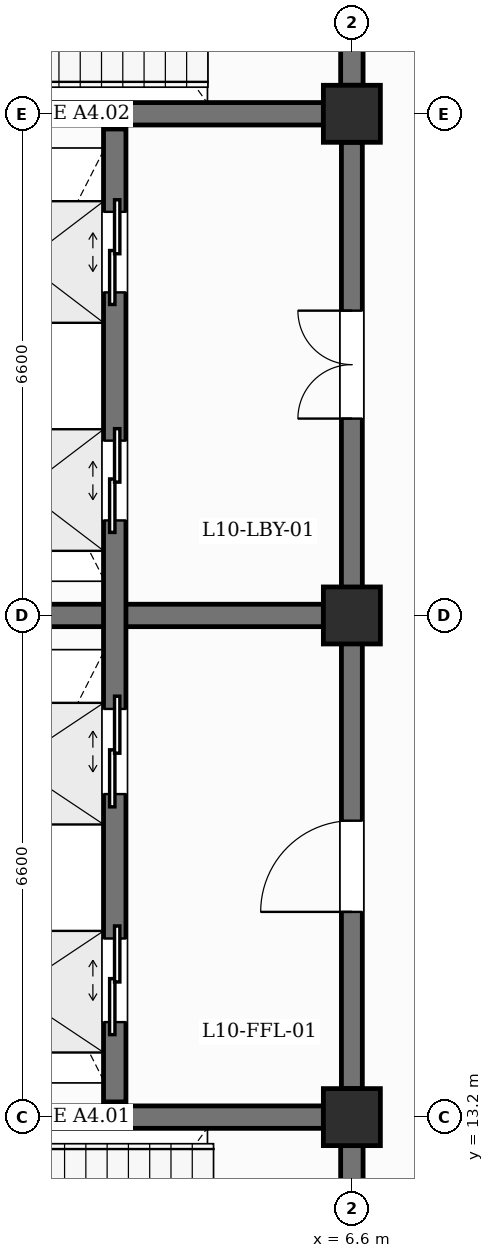
"""IFC4 building model, lengths in metres.
Left out: names, types, materials, properties, quantities, classifications, styles, units other than length and angle.
Written with IfcOpenShell. Run it as: python <this file> out.ifc"""

import sys

from ifc_helpers import new_model, si_unit, direction, frame, frame_2d, origin, origin_2d, place, context, subcontext, project, spatial, rectangle, extrude, element, fill, save


model = new_model("IFC4")
c1 = context("Model", 3, precision=1e-05, world=origin(), true_north=direction((0.0, 1.0)))
c2 = subcontext(c1, "Body", "Model", "MODEL_VIEW")
j1 = project(units=[si_unit("LENGTHUNIT", "METRE"), si_unit("PLANEANGLEUNIT", "RADIAN")], contexts=[c1])
p1 = place(None, origin())
s1 = spatial("IfcSite", under=j1, at=p1, CompositionType="ELEMENT")
p2 = place(p1, origin())
s2 = spatial("IfcBuilding", under=s1, at=p2, CompositionType="ELEMENT")
p3 = place(p2, frame((0.0, 0.0, 43.8)))
s3 = spatial("IfcBuildingStorey", under=s2, at=p3, CompositionType="ELEMENT", Elevation=43.8)
for number, where, z_axis, x_axis in (
    (1, (6.6, 13.2, 0.0), (0.0, 0.0, 1.0), (1.0, 0.0, 0.0)),
    (2, (6.6, 19.8, 0.0), (0.0, 0.0, 1.0), (1.0, 0.0, 0.0)),
    (3, (6.6, 26.4, 0.0), (0.0, 0.0, 1.0), (1.0, 0.0, 0.0)),
):
    element("IfcColumn", number, at=place(p3, frame(where, z_axis=z_axis, x_axis=x_axis)), inside=s3, PredefinedType="COLUMN", context=c2, shape_type="SweptSolid", body=[
        extrude(rectangle(XDim=0.75, YDim=0.75, at=origin_2d()), origin(), (0.0, 0.0, 1.0), 4.2),
    ])
p4 = place(p3, frame((0.375, 13.2, 0.0), z_axis=(0.0, 0.0, 1.0), x_axis=(1.0, 0.0, 0.0)))
e4 = element("IfcWall", 4, at=p4, inside=s3, PredefinedType="SHEAR", context=c2, shape_type="SweptSolid", body=[
    extrude(rectangle(XDim=5.85, YDim=0.295, at=frame_2d((2.925, 0.0))), origin(), (0.0, 0.0, 1.0), 3.29),
])
p5 = place(p3, frame((6.6, 6.975, 0.0), z_axis=(0.0, 0.0, 1.0), x_axis=(0.0, 1.0, 0.0)))
e5 = element("IfcWall", 5, at=p5, inside=s3, PredefinedType="SHEAR", context=c2, shape_type="SweptSolid", body=[
    extrude(rectangle(XDim=5.85, YDim=0.295, at=frame_2d((2.925, 0.0))), origin(), (0.0, 0.0, 1.0), 3.29),
])
p6 = place(p5, frame((2.35, 0.0, 0.0)))
e6 = element("IfcOpeningElement", 6, at=p6, cuts=e5, PredefinedType="OPENING", context=c2, shape_type="SweptSolid", body=[
    extrude(rectangle(XDim=1.15, YDim=2.2, at=frame_2d((0.575, 1.1))), frame((0.0, 0.157, 0.0), z_axis=(0.0, -1.0, 0.0), x_axis=(1.0, 0.0, 0.0)), (0.0, 0.0, 1.0), 0.315),
])
p7 = place(p3, frame((0.375, 26.4, 0.0), z_axis=(0.0, 0.0, 1.0), x_axis=(1.0, 0.0, 0.0)))
e7 = element("IfcWall", 7, at=p7, inside=s3, PredefinedType="SHEAR", context=c2, shape_type="SweptSolid", body=[
    extrude(rectangle(XDim=5.85, YDim=0.295, at=frame_2d((2.925, 0.0))), origin(), (0.0, 0.0, 1.0), 3.29),
])
p8 = place(p3, frame((6.6, 26.775, 0.0), z_axis=(0.0, 0.0, 1.0), x_axis=(0.0, 1.0, 0.0)))
e8 = element("IfcWall", 8, at=p8, inside=s3, PredefinedType="SHEAR", context=c2, shape_type="SweptSolid", body=[
    extrude(rectangle(XDim=5.875, YDim=0.295, at=frame_2d((2.938, 0.0))), origin(), (0.0, 0.0, 1.0), 3.29),
])
p9 = place(p8, frame((2.363, 0.0, 0.0)))
e9 = element("IfcOpeningElement", 9, at=p9, cuts=e8, PredefinedType="OPENING", context=c2, shape_type="SweptSolid", body=[
    extrude(rectangle(XDim=1.15, YDim=2.2, at=frame_2d((0.575, 1.1))), frame((0.0, 0.157, 0.0), z_axis=(0.0, -1.0, 0.0), x_axis=(1.0, 0.0, 0.0)), (0.0, 0.0, 1.0), 0.315),
])
p10 = place(p3, frame((0.375, 19.8, 0.0), z_axis=(0.0, 0.0, 1.0), x_axis=(1.0, 0.0, 0.0)))
e10 = element("IfcWall", 10, at=p10, inside=s3, PredefinedType="SHEAR", context=c2, shape_type="SweptSolid", body=[
    extrude(rectangle(XDim=5.85, YDim=0.295, at=frame_2d((2.925, 0.0))), origin(), (0.0, 0.0, 1.0), 3.29),
])
p11 = place(p3, frame((6.6, 13.575, 0.0), z_axis=(0.0, 0.0, 1.0), x_axis=(0.0, 1.0, 0.0)))
e11 = element("IfcWall", 11, at=p11, inside=s3, PredefinedType="SHEAR", context=c2, shape_type="SweptSolid", body=[
    extrude(rectangle(XDim=5.85, YDim=0.275, at=frame_2d((2.925, 0.0))), origin(), (0.0, 0.0, 1.0), 3.29),
])
p12 = place(p11, frame((2.325, 0.0, 0.0)))
e12 = element("IfcOpeningElement", 12, at=p12, cuts=e11, PredefinedType="OPENING", context=c2, shape_type="SweptSolid", body=[
    extrude(rectangle(XDim=1.2, YDim=2.25, at=frame_2d((0.6, 1.125))), frame((0.0, 0.147, 0.0), z_axis=(0.0, -1.0, 0.0), x_axis=(1.0, 0.0, 0.0)), (0.0, 0.0, 1.0), 0.295),
])
p13 = place(p3, frame((6.6, 20.175, 0.0), z_axis=(0.0, 0.0, 1.0), x_axis=(0.0, 1.0, 0.0)))
e13 = element("IfcWall", 13, at=p13, inside=s3, PredefinedType="SHEAR", context=c2, shape_type="SweptSolid", body=[
    extrude(rectangle(XDim=5.85, YDim=0.275, at=frame_2d((2.925, 0.0))), origin(), (0.0, 0.0, 1.0), 3.29),
])
p14 = place(p13, frame((2.215, 0.0, 0.0)))
e14 = element("IfcOpeningElement", 14, at=p14, cuts=e13, PredefinedType="OPENING", context=c2, shape_type="SweptSolid", body=[
    extrude(rectangle(XDim=1.42, YDim=2.2, at=frame_2d((0.71, 1.1))), frame((0.0, 0.147, 0.0), z_axis=(0.0, -1.0, 0.0), x_axis=(1.0, 0.0, 0.0)), (0.0, 0.0, 1.0), 0.295),
])
p15 = place(p3, frame((3.48, 13.4, 0.0), z_axis=(0.0, 0.0, 1.0), x_axis=(0.0, 1.0, 0.0)))
e15 = element("IfcWall", 15, at=p15, inside=s3, PredefinedType="SHEAR", context=c2, shape_type="SweptSolid", body=[
    extrude(rectangle(XDim=6.2, YDim=0.295, at=frame_2d((3.1, 0.0))), origin(), (0.0, 0.0, 1.0), 3.89),
])
p16 = place(p15, frame((1.05, 0.0, 0.0)))
e16 = element("IfcOpeningElement", 16, at=p16, cuts=e15, PredefinedType="OPENING", context=c2, shape_type="SweptSolid", body=[
    extrude(rectangle(XDim=1.1, YDim=2.15, at=frame_2d((0.55, 1.075))), frame((0.0, 0.157, 0.0), z_axis=(0.0, -1.0, 0.0), x_axis=(1.0, 0.0, 0.0)), (0.0, 0.0, 1.0), 0.315),
])
p17 = place(p15, frame((4.05, 0.0, 0.0)))
e17 = element("IfcOpeningElement", 17, at=p17, cuts=e15, PredefinedType="OPENING", context=c2, shape_type="SweptSolid", body=[
    extrude(rectangle(XDim=1.12, YDim=2.15, at=frame_2d((0.56, 1.075))), frame((0.0, 0.157, 0.0), z_axis=(0.0, -1.0, 0.0), x_axis=(1.0, 0.0, 0.0)), (0.0, 0.0, 1.0), 0.315),
])
p18 = place(p3, frame((3.48, 20.0, 0.0), z_axis=(0.0, 0.0, 1.0), x_axis=(0.0, 1.0, 0.0)))
e18 = element("IfcWall", 18, at=p18, inside=s3, PredefinedType="SHEAR", context=c2, shape_type="SweptSolid", body=[
    extrude(rectangle(XDim=6.2, YDim=0.295, at=frame_2d((3.1, 0.0))), origin(), (0.0, 0.0, 1.0), 3.89),
])
p19 = place(p18, frame((1.05, 0.0, 0.0)))
e19 = element("IfcOpeningElement", 19, at=p19, cuts=e18, PredefinedType="OPENING", context=c2, shape_type="SweptSolid", body=[
    extrude(rectangle(XDim=1.05, YDim=2.15, at=frame_2d((0.525, 1.075))), frame((0.0, 0.157, 0.0), z_axis=(0.0, -1.0, 0.0), x_axis=(1.0, 0.0, 0.0)), (0.0, 0.0, 1.0), 0.315),
])
p20 = place(p18, frame((4.05, 0.0, 0.0)))
e20 = element("IfcOpeningElement", 20, at=p20, cuts=e18, PredefinedType="OPENING", context=c2, shape_type="SweptSolid", body=[
    extrude(rectangle(XDim=1.06, YDim=2.15, at=frame_2d((0.53, 1.075))), frame((0.0, 0.157, 0.0), z_axis=(0.0, -1.0, 0.0), x_axis=(1.0, 0.0, 0.0)), (0.0, 0.0, 1.0), 0.315),
])
p21 = place(p16, origin())
e21 = element("IfcDoor", 21, at=p21, inside=s3, OperationType="DOUBLE_DOOR_SLIDING", PredefinedType="USERDEFINED", context=c2, shape_type="SweptSolid", body=[
    extrude(rectangle(XDim=1.1, YDim=2.15, at=frame_2d((0.55, 1.075))), frame((0.0, 0.025, 0.0), z_axis=(0.0, -1.0, 0.0), x_axis=(1.0, 0.0, 0.0)), (0.0, 0.0, 1.0), 0.05),
])
fill(e16, e21)
p22 = place(p17, origin())
e22 = element("IfcDoor", 22, at=p22, inside=s3, OperationType="DOUBLE_DOOR_SLIDING", PredefinedType="USERDEFINED", context=c2, shape_type="SweptSolid", body=[
    extrude(rectangle(XDim=1.12, YDim=2.15, at=frame_2d((0.56, 1.075))), frame((0.0, 0.025, 0.0), z_axis=(0.0, -1.0, 0.0), x_axis=(1.0, 0.0, 0.0)), (0.0, 0.0, 1.0), 0.05),
])
fill(e17, e22)
p23 = place(p19, origin())
e23 = element("IfcDoor", 23, at=p23, inside=s3, OperationType="DOUBLE_DOOR_SLIDING", PredefinedType="USERDEFINED", context=c2, shape_type="SweptSolid", body=[
    extrude(rectangle(XDim=1.05, YDim=2.15, at=frame_2d((0.525, 1.075))), frame((0.0, 0.025, 0.0), z_axis=(0.0, -1.0, 0.0), x_axis=(1.0, 0.0, 0.0)), (0.0, 0.0, 1.0), 0.05),
])
fill(e19, e23)
p24 = place(p20, origin())
e24 = element("IfcDoor", 24, at=p24, inside=s3, OperationType="DOUBLE_DOOR_SLIDING", PredefinedType="USERDEFINED", context=c2, shape_type="SweptSolid", body=[
    extrude(rectangle(XDim=1.06, YDim=2.15, at=frame_2d((0.53, 1.075))), frame((0.0, 0.025, 0.0), z_axis=(0.0, -1.0, 0.0), x_axis=(1.0, 0.0, 0.0)), (0.0, 0.0, 1.0), 0.05),
])
fill(e20, e24)
p25 = place(p12, origin())
e25 = element("IfcDoor", 25, at=p25, inside=s3, OperationType="SINGLE_SWING_LEFT", PredefinedType="DOOR", context=c2, shape_type="SweptSolid", body=[
    extrude(rectangle(XDim=1.2, YDim=2.25, at=frame_2d((0.6, 1.125))), frame((0.0, 0.025, 0.0), z_axis=(0.0, -1.0, 0.0), x_axis=(1.0, 0.0, 0.0)), (0.0, 0.0, 1.0), 0.05),
])
fill(e12, e25)
p26 = place(p14, origin())
e26 = element("IfcDoor", 26, at=p26, inside=s3, OperationType="DOUBLE_DOOR_SINGLE_SWING", PredefinedType="DOOR", context=c2, shape_type="SweptSolid", body=[
    extrude(rectangle(XDim=1.42, YDim=2.2, at=frame_2d((0.71, 1.1))), frame((0.0, 0.025, 0.0), z_axis=(0.0, -1.0, 0.0), x_axis=(1.0, 0.0, 0.0)), (0.0, 0.0, 1.0), 0.05),
])
fill(e14, e26)
save(model, sys.argv[1])
